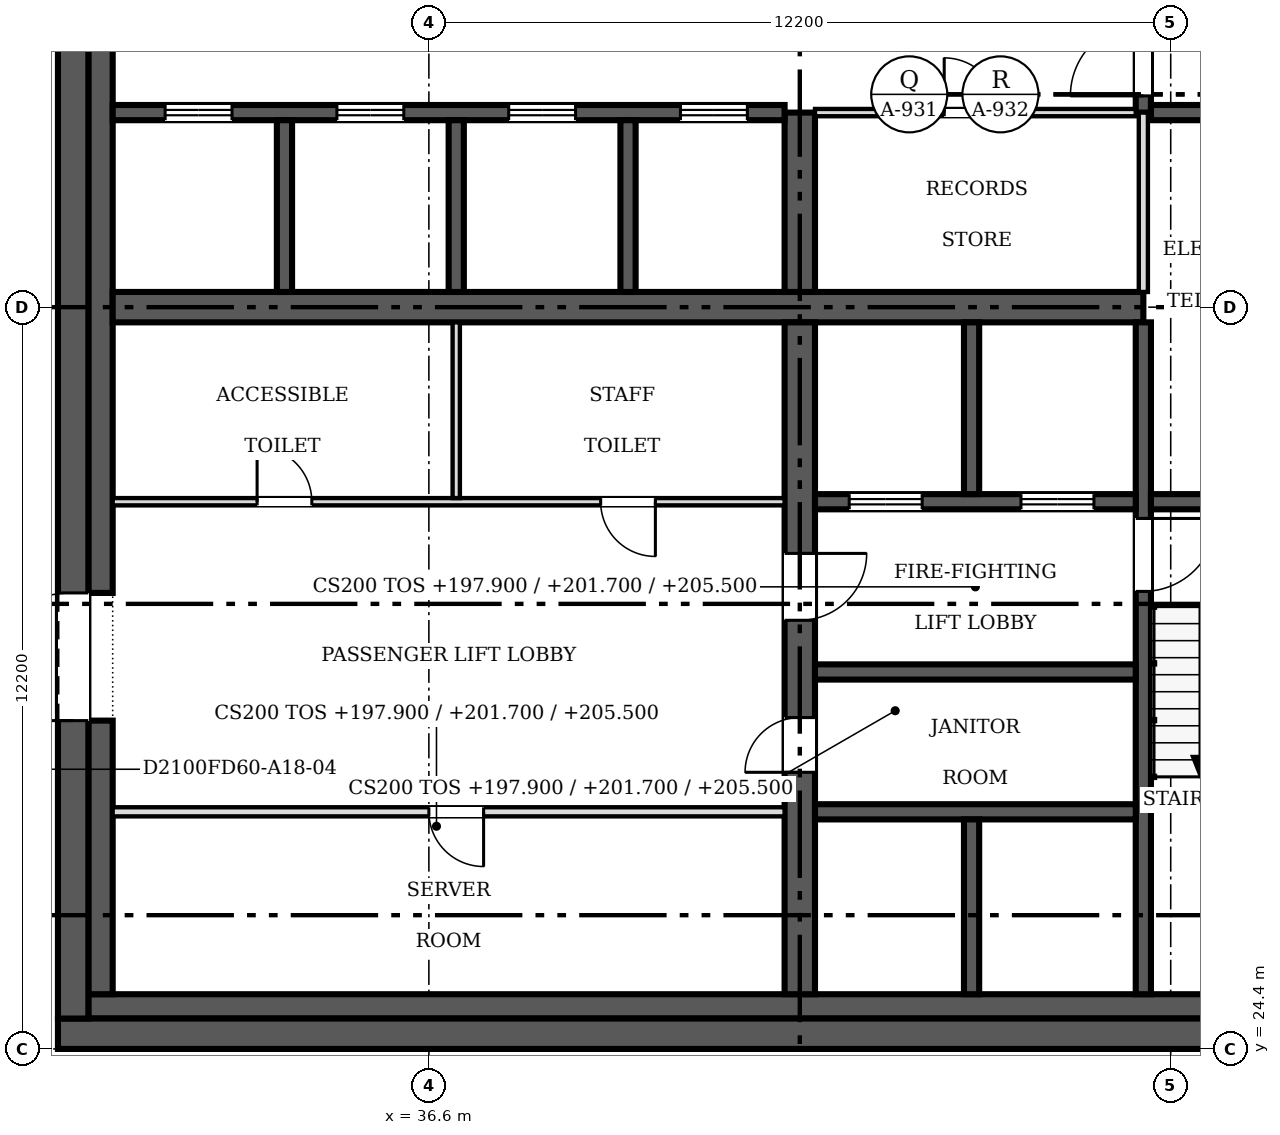
"""IFC4 building model, lengths in metres.
Left out: names, types, materials, properties, quantities, classifications, styles, units other than length and angle.
Written with IfcOpenShell. Run it as: python <this file> out.ifc"""

import sys

from ifc_helpers import new_model, si_unit, direction, frame, frame_2d, origin, place, context, subcontext, project, spatial, rectangle, extrude, source, transform, mapped, element, fill, save


model = new_model("IFC4")
c1 = context("Model", 3, precision=1e-05, world=origin(), true_north=direction((0.0, 1.0)))
c2 = subcontext(c1, "Body", "Model", "MODEL_VIEW")
j1 = project(units=[si_unit("LENGTHUNIT", "METRE"), si_unit("PLANEANGLEUNIT", "RADIAN")], contexts=[c1])
p1 = place(None, origin())
s1 = spatial("IfcSite", under=j1, at=p1, CompositionType="ELEMENT")
p2 = place(p1, origin())
s2 = spatial("IfcBuilding", under=s1, at=p2, CompositionType="ELEMENT")
p3 = place(p2, frame((0.0, 0.0, 197.9)))
s3 = spatial("IfcBuildingStorey", under=s2, at=p3, CompositionType="ELEMENT", Elevation=197.9)
p4 = place(p3, frame((54.9, 24.65, 0.0), z_axis=(0.0, 0.0, 1.0), x_axis=(-1.0, 0.0, 0.0)))
e1 = element("IfcWall", 1, at=p4, inside=s3, PredefinedType="SHEAR", context=c2, shape_type="SweptSolid", body=[
    extrude(rectangle(XDim=24.4, YDim=0.5, at=frame_2d((12.2, 0.0))), origin(), (0.0, 0.0, 1.0), 3.8),
])
m1 = source(origin(), c2, "Body", "SweptSolid", [
    extrude(rectangle(XDim=1.2, YDim=2.1, at=frame_2d((0.6, 1.05))), frame((0.0, 0.26, 0.0), z_axis=(0.0, -1.0, 0.0), x_axis=(1.0, 0.0, 0.0)), (0.0, 0.0, 1.0), 0.52),
])
p5 = place(p4, frame((1.5, 0.0, 0.0)))
e2 = element("IfcOpeningElement", 2, at=p5, cuts=e1, PredefinedType="OPENING", context=c2, shape_type="MappedRepresentation", body=[
    mapped(m1, transform((0.0, 0.0, 0.0), scale=1.0)),
])
p6 = place(p3, frame((30.75, 24.9, 0.0), z_axis=(0.0, 0.0, 1.0), x_axis=(0.0, 1.0, 0.0)))
e3 = element("IfcWall", 3, at=p6, inside=s3, PredefinedType="SHEAR", context=c2, shape_type="SweptSolid", body=[
    extrude(rectangle(XDim=23.4, YDim=0.5, at=frame_2d((11.7, 0.0))), origin(), (0.0, 0.0, 1.0), 3.8),
])
m2 = source(origin(), c2, "Body", "SweptSolid", [
    extrude(rectangle(XDim=2.1, YDim=2.4, at=frame_2d((1.05, 1.2))), frame((0.0, 0.26, 0.0), z_axis=(0.0, -1.0, 0.0), x_axis=(1.0, 0.0, 0.0)), (0.0, 0.0, 1.0), 0.52),
])
p7 = place(p6, frame((4.9, 0.0, 0.0)))
e4 = element("IfcOpeningElement", 4, at=p7, cuts=e3, PredefinedType="OPENING", context=c2, shape_type="MappedRepresentation", body=[
    mapped(m2, transform((0.0, 0.0, 0.0), scale=1.0)),
])
p8 = place(p6, frame((16.4, 0.0, 0.0)))
e5 = element("IfcOpeningElement", 5, at=p8, cuts=e3, PredefinedType="OPENING", context=c2, shape_type="MappedRepresentation", body=[
    mapped(m2, transform((0.0, 0.0, 0.0), scale=1.0)),
])
p9 = place(p3, frame((31.0, 25.1, 0.0), z_axis=(0.0, 0.0, 1.0), x_axis=(1.0, 0.0, 0.0)))
e6 = element("IfcWall", 6, at=p9, inside=s3, PredefinedType="SOLIDWALL", context=c2, shape_type="SweptSolid", body=[
    extrude(rectangle(XDim=21.2, YDim=0.4, at=frame_2d((10.6, 0.0))), origin(), (0.0, 0.0, 1.0), 3.8),
])
p10 = place(p3, frame((31.2, 25.3, 0.0), z_axis=(0.0, 0.0, 1.0), x_axis=(0.0, 1.0, 0.0)))
e7 = element("IfcWall", 7, at=p10, inside=s3, PredefinedType="SOLIDWALL", context=c2, shape_type="SweptSolid", body=[
    extrude(rectangle(XDim=4.5, YDim=0.4, at=frame_2d((2.25, 0.0))), origin(), (0.0, 0.0, 1.0), 3.8),
])
p11 = place(p3, frame((31.2, 31.9, 0.0), z_axis=(0.0, 0.0, 1.0), x_axis=(0.0, 1.0, 0.0)))
e8 = element("IfcWall", 8, at=p11, inside=s3, PredefinedType="SOLIDWALL", context=c2, shape_type="SweptSolid", body=[
    extrude(rectangle(XDim=9.4, YDim=0.4, at=frame_2d((4.7, 0.0))), origin(), (0.0, 0.0, 1.0), 3.8),
])
p12 = place(p3, frame((31.4, 36.6, 0.0), z_axis=(0.0, 0.0, 1.0), x_axis=(1.0, 0.0, 0.0)))
e9 = element("IfcWall", 9, at=p12, inside=s3, PredefinedType="SHEAR", context=c2, shape_type="SweptSolid", body=[
    extrude(rectangle(XDim=16.95, YDim=0.5, at=frame_2d((8.475, 0.0))), origin(), (0.0, 0.0, 1.0), 3.8),
])
p13 = place(p3, frame((42.7, 36.35, 0.0), z_axis=(0.0, 0.0, 1.0), x_axis=(0.0, -1.0, 0.0)))
e10 = element("IfcWall", 10, at=p13, inside=s3, PredefinedType="SHEAR", context=c2, shape_type="SweptSolid", body=[
    extrude(rectangle(XDim=11.05, YDim=0.5, at=frame_2d((5.525, 0.0))), origin(), (0.0, 0.0, 1.0), 3.8),
])
m3 = source(origin(), c2, "Body", "SweptSolid", [
    extrude(rectangle(XDim=0.9, YDim=2.1, at=frame_2d((0.45, 1.05))), frame((0.0, 0.26, 0.0), z_axis=(0.0, -1.0, 0.0), x_axis=(1.0, 0.0, 0.0)), (0.0, 0.0, 1.0), 0.52),
])
p14 = place(p13, frame((6.5, 0.0, 0.0)))
e11 = element("IfcOpeningElement", 11, at=p14, cuts=e10, PredefinedType="OPENING", context=c2, shape_type="MappedRepresentation", body=[
    mapped(m3, transform((0.0, 0.0, 0.0), scale=1.0)),
])
m4 = source(origin(), c2, "Body", "SweptSolid", [
    extrude(rectangle(XDim=1.1, YDim=2.1, at=frame_2d((0.55, 1.05))), frame((0.0, 0.26, 0.0), z_axis=(0.0, -1.0, 0.0), x_axis=(1.0, 0.0, 0.0)), (0.0, 0.0, 1.0), 0.52),
])
p15 = place(p13, frame((3.8, 0.0, 0.0)))
e12 = element("IfcOpeningElement", 12, at=p15, cuts=e10, PredefinedType="OPENING", context=c2, shape_type="MappedRepresentation", body=[
    mapped(m4, transform((0.0, 0.0, 0.0), scale=1.0)),
])
p16 = place(p3, frame((42.7, 36.85, 0.0), z_axis=(0.0, 0.0, 1.0), x_axis=(0.0, 1.0, 0.0)))
e13 = element("IfcWall", 13, at=p16, inside=s3, PredefinedType="SHEAR", context=c2, shape_type="SweptSolid", body=[
    extrude(rectangle(XDim=2.95, YDim=0.5, at=frame_2d((1.475, 0.0))), origin(), (0.0, 0.0, 1.0), 3.8),
])
p17 = place(p3, frame((31.4, 39.8, 0.0), z_axis=(0.0, 0.0, 1.0), x_axis=(1.0, 0.0, 0.0)))
e14 = element("IfcWall", 14, at=p17, inside=s3, PredefinedType="SOLIDWALL", context=c2, shape_type="SweptSolid", body=[
    extrude(rectangle(XDim=11.05, YDim=0.25, at=frame_2d((5.525, 0.0))), origin(), (0.0, 0.0, 1.0), 3.8),
])
m5 = source(origin(), c2, "Body", "SweptSolid", [
    extrude(rectangle(XDim=1.1, YDim=2.1, at=frame_2d((0.55, 1.05))), frame((0.0, 0.135, 0.0), z_axis=(0.0, -1.0, 0.0), x_axis=(1.0, 0.0, 0.0)), (0.0, 0.0, 1.0), 0.27),
])
p18 = place(p17, frame((0.863, 0.0, 0.0)))
e15 = element("IfcOpeningElement", 15, at=p18, cuts=e14, PredefinedType="OPENING", context=c2, shape_type="MappedRepresentation", body=[
    mapped(m5, transform((0.0, 0.0, 0.0), scale=1.0)),
])
p19 = place(p17, frame((3.688, 0.0, 0.0)))
e16 = element("IfcOpeningElement", 16, at=p19, cuts=e14, PredefinedType="OPENING", context=c2, shape_type="MappedRepresentation", body=[
    mapped(m5, transform((0.0, 0.0, 0.0), scale=1.0)),
])
p20 = place(p17, frame((6.512, 0.0, 0.0)))
e17 = element("IfcOpeningElement", 17, at=p20, cuts=e14, PredefinedType="OPENING", context=c2, shape_type="MappedRepresentation", body=[
    mapped(m5, transform((0.0, 0.0, 0.0), scale=1.0)),
])
p21 = place(p17, frame((9.337, 0.0, 0.0)))
e18 = element("IfcOpeningElement", 18, at=p21, cuts=e14, PredefinedType="OPENING", context=c2, shape_type="MappedRepresentation", body=[
    mapped(m5, transform((0.0, 0.0, 0.0), scale=1.0)),
])
p22 = place(p3, frame((48.35, 36.35, 0.0), z_axis=(0.0, 0.0, 1.0), x_axis=(0.0, -1.0, 0.0)))
e19 = element("IfcWall", 19, at=p22, inside=s3, PredefinedType="SOLIDWALL", context=c2, shape_type="SweptSolid", body=[
    extrude(rectangle(XDim=11.05, YDim=0.25, at=frame_2d((5.525, 0.0))), origin(), (0.0, 0.0, 1.0), 3.8),
])
m6 = source(origin(), c2, "Body", "SweptSolid", [
    extrude(rectangle(XDim=1.2, YDim=2.1, at=frame_2d((0.6, 1.05))), frame((0.0, 0.135, 0.0), z_axis=(0.0, -1.0, 0.0), x_axis=(1.0, 0.0, 0.0)), (0.0, 0.0, 1.0), 0.27),
])
p23 = place(p22, frame((3.225, 0.0, 0.0)))
e20 = element("IfcOpeningElement", 20, at=p23, cuts=e19, PredefinedType="OPENING", context=c2, shape_type="MappedRepresentation", body=[
    mapped(m6, transform((0.0, 0.0, 0.0), scale=1.0)),
])
p24 = place(p3, frame((48.225, 33.4, 0.0), z_axis=(0.0, 0.0, 1.0), x_axis=(-1.0, 0.0, 0.0)))
e21 = element("IfcWall", 21, at=p24, inside=s3, PredefinedType="SOLIDWALL", context=c2, shape_type="SweptSolid", body=[
    extrude(rectangle(XDim=5.275, YDim=0.25, at=frame_2d((2.638, 0.0))), origin(), (0.0, 0.0, 1.0), 3.8),
])
p25 = place(p24, frame((3.512, 0.0, 0.0)))
e22 = element("IfcOpeningElement", 22, at=p25, cuts=e21, PredefinedType="OPENING", context=c2, shape_type="MappedRepresentation", body=[
    mapped(m6, transform((0.0, 0.0, 0.0), scale=1.0)),
])
p26 = place(p24, frame((0.688, 0.0, 0.0)))
e23 = element("IfcOpeningElement", 23, at=p26, cuts=e21, PredefinedType="OPENING", context=c2, shape_type="MappedRepresentation", body=[
    mapped(m6, transform((0.0, 0.0, 0.0), scale=1.0)),
])
p27 = place(p3, frame((48.475, 33.4, 0.0), z_axis=(0.0, 0.0, 1.0), x_axis=(1.0, 0.0, 0.0)))
e24 = element("IfcWall", 24, at=p27, inside=s3, PredefinedType="SOLIDWALL", context=c2, shape_type="SweptSolid", body=[
    extrude(rectangle(XDim=3.525, YDim=0.25, at=frame_2d((1.762, 0.0))), origin(), (0.0, 0.0, 1.0), 3.8),
])
p28 = place(p3, frame((48.35, 47.9, 0.0), z_axis=(0.0, 0.0, 1.0), x_axis=(0.0, -1.0, 0.0)))
e25 = element("IfcWall", 25, at=p28, inside=s3, PredefinedType="SOLIDWALL", context=c2, shape_type="SweptSolid", body=[
    extrude(rectangle(XDim=8.1, YDim=0.25, at=frame_2d((4.05, 0.0))), origin(), (0.0, 0.0, 1.0), 3.8),
])
p29 = place(p28, frame((6.625, 0.0, 0.0)))
e26 = element("IfcOpeningElement", 26, at=p29, cuts=e25, PredefinedType="OPENING", context=c2, shape_type="MappedRepresentation", body=[
    mapped(m6, transform((0.0, 0.0, 0.0), scale=1.0)),
])
for number, where, z_axis, x_axis in (
    (27, (42.95, 28.3, 0.0), (0.0, 0.0, 1.0), (1.0, 0.0, 0.0)),
    (28, (42.95, 30.6, 0.0), (0.0, 0.0, 1.0), (1.0, 0.0, 0.0)),
):
    element("IfcWall", number, at=place(p3, frame(where, z_axis=z_axis, x_axis=x_axis)), inside=s3, PredefinedType="SOLIDWALL", context=c2, shape_type="SweptSolid", body=[
        extrude(rectangle(XDim=5.275, YDim=0.25, at=frame_2d((2.638, 0.0))), origin(), (0.0, 0.0, 1.0), 3.8),
    ])
p30 = place(p3, frame((48.475, 39.8, 0.0), z_axis=(0.0, 0.0, 1.0), x_axis=(1.0, 0.0, 0.0)))
e29 = element("IfcWall", 29, at=p30, inside=s3, PredefinedType="SOLIDWALL", context=c2, shape_type="SweptSolid", body=[
    extrude(rectangle(XDim=3.4, YDim=0.25, at=frame_2d((1.7, 0.0))), origin(), (0.0, 0.0, 1.0), 3.8),
])
for number, where, z_axis, x_axis in (
    (30, (34.225, 36.85, 0.0), (0.0, 0.0, 1.0), (0.0, 1.0, 0.0)),
    (31, (37.05, 36.85, 0.0), (0.0, 0.0, 1.0), (0.0, 1.0, 0.0)),
    (32, (39.875, 36.85, 0.0), (0.0, 0.0, 1.0), (0.0, 1.0, 0.0)),
):
    element("IfcWall", number, at=place(p3, frame(where, z_axis=z_axis, x_axis=x_axis)), inside=s3, PredefinedType="SOLIDWALL", context=c2, shape_type="SweptSolid", body=[
        extrude(rectangle(XDim=2.825, YDim=0.25, at=frame_2d((1.413, 0.0))), origin(), (0.0, 0.0, 1.0), 3.8),
    ])
p31 = place(p3, frame((45.525, 33.525, 0.0), z_axis=(0.0, 0.0, 1.0), x_axis=(0.0, 1.0, 0.0)))
e33 = element("IfcWall", 33, at=p31, inside=s3, PredefinedType="SOLIDWALL", context=c2, shape_type="SweptSolid", body=[
    extrude(rectangle(XDim=2.825, YDim=0.25, at=frame_2d((1.413, 0.0))), origin(), (0.0, 0.0, 1.0), 3.8),
])
p32 = place(p3, frame((45.525, 25.3, 0.0), z_axis=(0.0, 0.0, 1.0), x_axis=(0.0, 1.0, 0.0)))
e34 = element("IfcWall", 34, at=p32, inside=s3, PredefinedType="SOLIDWALL", context=c2, shape_type="SweptSolid", body=[
    extrude(rectangle(XDim=2.875, YDim=0.25, at=frame_2d((1.438, 0.0))), origin(), (0.0, 0.0, 1.0), 3.8),
])
p33 = place(p3, frame((42.45, 28.3, 0.0), z_axis=(0.0, 0.0, 1.0), x_axis=(-1.0, 0.0, 0.0)))
e35 = element("IfcWall", 35, at=p33, inside=s3, PredefinedType="PARTITIONING", context=c2, shape_type="SweptSolid", body=[
    extrude(rectangle(XDim=11.05, YDim=0.15, at=frame_2d((5.525, 0.0))), origin(), (0.0, 0.0, 1.0), 3.6),
])
m7 = source(origin(), c2, "Body", "SweptSolid", [
    extrude(rectangle(XDim=0.9, YDim=2.1, at=frame_2d((0.45, 1.05))), frame((0.0, 0.085, 0.0), z_axis=(0.0, -1.0, 0.0), x_axis=(1.0, 0.0, 0.0)), (0.0, 0.0, 1.0), 0.17),
])
p34 = place(p33, frame((4.95, 0.0, 0.0)))
e36 = element("IfcOpeningElement", 36, at=p34, cuts=e35, PredefinedType="OPENING", context=c2, shape_type="MappedRepresentation", body=[
    mapped(m7, transform((0.0, 0.0, 0.0), scale=1.0)),
])
p35 = place(p3, frame((31.4, 33.4, 0.0), z_axis=(0.0, 0.0, 1.0), x_axis=(1.0, 0.0, 0.0)))
e37 = element("IfcWall", 37, at=p35, inside=s3, PredefinedType="PARTITIONING", context=c2, shape_type="SweptSolid", body=[
    extrude(rectangle(XDim=11.05, YDim=0.12, at=frame_2d((5.525, 0.0))), origin(), (0.0, 0.0, 1.0), 3.6),
])
m8 = source(origin(), c2, "Body", "SweptSolid", [
    extrude(rectangle(XDim=0.9, YDim=2.1, at=frame_2d((0.45, 1.05))), frame((0.0, 0.07, 0.0), z_axis=(0.0, -1.0, 0.0), x_axis=(1.0, 0.0, 0.0)), (0.0, 0.0, 1.0), 0.14),
])
p36 = place(p35, frame((2.375, 0.0, 0.0)))
e38 = element("IfcOpeningElement", 38, at=p36, cuts=e37, PredefinedType="OPENING", context=c2, shape_type="MappedRepresentation", body=[
    mapped(m8, transform((0.0, 0.0, 0.0), scale=1.0)),
])
p37 = place(p35, frame((8.025, 0.0, 0.0)))
e39 = element("IfcOpeningElement", 39, at=p37, cuts=e37, PredefinedType="OPENING", context=c2, shape_type="MappedRepresentation", body=[
    mapped(m8, transform((0.0, 0.0, 0.0), scale=1.0)),
])
p38 = place(p3, frame((48.225, 39.8, 0.0), z_axis=(0.0, 0.0, 1.0), x_axis=(-1.0, 0.0, 0.0)))
e40 = element("IfcWall", 40, at=p38, inside=s3, PredefinedType="PARTITIONING", context=c2, shape_type="SweptSolid", body=[
    extrude(rectangle(XDim=5.275, YDim=0.12, at=frame_2d((2.638, 0.0))), origin(), (0.0, 0.0, 1.0), 3.6),
])
p39 = place(p38, frame((2.25, 0.0, 0.0)))
e41 = element("IfcOpeningElement", 41, at=p39, cuts=e40, PredefinedType="OPENING", context=c2, shape_type="MappedRepresentation", body=[
    mapped(m8, transform((0.0, 0.0, 0.0), scale=1.0)),
])
p40 = place(p3, frame((48.35, 36.85, 0.0), z_axis=(0.0, 0.0, 1.0), x_axis=(0.0, 1.0, 0.0)))
e42 = element("IfcWall", 42, at=p40, inside=s3, PredefinedType="PARTITIONING", context=c2, shape_type="SweptSolid", body=[
    extrude(rectangle(XDim=2.95, YDim=0.15, at=frame_2d((1.475, 0.0))), origin(), (0.0, 0.0, 1.0), 3.6),
])
p41 = place(p3, frame((37.05, 33.46, 0.0), z_axis=(0.0, 0.0, 1.0), x_axis=(0.0, 1.0, 0.0)))
e43 = element("IfcWall", 43, at=p41, inside=s3, PredefinedType="PARTITIONING", context=c2, shape_type="SweptSolid", body=[
    extrude(rectangle(XDim=2.89, YDim=0.12, at=frame_2d((1.445, 0.0))), origin(), (0.0, 0.0, 1.0), 3.6),
])
m9 = source(origin(), c2, "Body", "SweptSolid", [
    extrude(rectangle(XDim=2.1, YDim=2.4, at=frame_2d((1.05, 1.2))), frame((0.0, 0.025, 0.0), z_axis=(0.0, -1.0, 0.0), x_axis=(1.0, 0.0, 0.0)), (0.0, 0.0, 1.0), 0.05),
])
p42 = place(p7, origin())
e44 = element("IfcDoor", 44, at=p42, inside=s3, OperationType="DOUBLE_DOOR_SINGLE_SWING", PredefinedType="DOOR", context=c2, shape_type="MappedRepresentation", body=[
    mapped(m9, transform((0.0, 0.0, 0.0), scale=1.0)),
])
fill(e4, e44)
m10 = source(origin(), c2, "Body", "SweptSolid", [
    extrude(rectangle(XDim=0.9, YDim=2.1, at=frame_2d((0.45, 1.05))), frame((0.0, 0.025, 0.0), z_axis=(0.0, -1.0, 0.0), x_axis=(1.0, 0.0, 0.0)), (0.0, 0.0, 1.0), 0.05),
])
p43 = place(p14, origin())
e45 = element("IfcDoor", 45, at=p43, inside=s3, OperationType="SINGLE_SWING_RIGHT", PredefinedType="DOOR", context=c2, shape_type="MappedRepresentation", body=[
    mapped(m10, transform((0.0, 0.0, 0.0), scale=1.0)),
])
fill(e11, e45)
m11 = source(origin(), c2, "Body", "SweptSolid", [
    extrude(rectangle(XDim=1.1, YDim=2.1, at=frame_2d((0.55, 1.05))), frame((0.0, 0.025, 0.0), z_axis=(0.0, -1.0, 0.0), x_axis=(1.0, 0.0, 0.0)), (0.0, 0.0, 1.0), 0.05),
])
p44 = place(p15, origin())
e46 = element("IfcDoor", 46, at=p44, inside=s3, OperationType="SINGLE_SWING_LEFT", PredefinedType="DOOR", context=c2, shape_type="MappedRepresentation", body=[
    mapped(m11, transform((0.0, 0.0, 0.0), scale=1.0)),
])
fill(e12, e46)
p45 = place(p18, origin())
e47 = element("IfcDoor", 47, at=p45, inside=s3, OperationType="DOUBLE_DOOR_SLIDING", PredefinedType="DOOR", context=c2, shape_type="MappedRepresentation", body=[
    mapped(m11, transform((0.0, 0.0, 0.0), scale=1.0)),
])
fill(e15, e47)
p46 = place(p19, origin())
e48 = element("IfcDoor", 48, at=p46, inside=s3, OperationType="DOUBLE_DOOR_SLIDING", PredefinedType="DOOR", context=c2, shape_type="MappedRepresentation", body=[
    mapped(m11, transform((0.0, 0.0, 0.0), scale=1.0)),
])
fill(e16, e48)
p47 = place(p20, origin())
e49 = element("IfcDoor", 49, at=p47, inside=s3, OperationType="DOUBLE_DOOR_SLIDING", PredefinedType="DOOR", context=c2, shape_type="MappedRepresentation", body=[
    mapped(m11, transform((0.0, 0.0, 0.0), scale=1.0)),
])
fill(e17, e49)
p48 = place(p21, origin())
e50 = element("IfcDoor", 50, at=p48, inside=s3, OperationType="DOUBLE_DOOR_SLIDING", PredefinedType="DOOR", context=c2, shape_type="MappedRepresentation", body=[
    mapped(m11, transform((0.0, 0.0, 0.0), scale=1.0)),
])
fill(e18, e50)
m12 = source(origin(), c2, "Body", "SweptSolid", [
    extrude(rectangle(XDim=1.2, YDim=2.1, at=frame_2d((0.6, 1.05))), frame((0.0, 0.025, 0.0), z_axis=(0.0, -1.0, 0.0), x_axis=(1.0, 0.0, 0.0)), (0.0, 0.0, 1.0), 0.05),
])
p49 = place(p23, origin())
e51 = element("IfcDoor", 51, at=p49, inside=s3, OperationType="SINGLE_SWING_LEFT", PredefinedType="DOOR", context=c2, shape_type="MappedRepresentation", body=[
    mapped(m12, transform((0.0, 0.0, 0.0), scale=1.0)),
])
fill(e20, e51)
p50 = place(p25, origin())
e52 = element("IfcDoor", 52, at=p50, inside=s3, OperationType="DOUBLE_DOOR_SLIDING", PredefinedType="DOOR", context=c2, shape_type="MappedRepresentation", body=[
    mapped(m12, transform((0.0, 0.0, 0.0), scale=1.0)),
])
fill(e22, e52)
p51 = place(p26, origin())
e53 = element("IfcDoor", 53, at=p51, inside=s3, OperationType="DOUBLE_DOOR_SLIDING", PredefinedType="DOOR", context=c2, shape_type="MappedRepresentation", body=[
    mapped(m12, transform((0.0, 0.0, 0.0), scale=1.0)),
])
fill(e23, e53)
p52 = place(p29, origin())
e54 = element("IfcDoor", 54, at=p52, inside=s3, OperationType="SINGLE_SWING_RIGHT", PredefinedType="DOOR", context=c2, shape_type="MappedRepresentation", body=[
    mapped(m12, transform((0.0, 0.0, 0.0), scale=1.0)),
])
fill(e26, e54)
p53 = place(p34, origin())
e55 = element("IfcDoor", 55, at=p53, inside=s3, OperationType="SINGLE_SWING_LEFT", PredefinedType="DOOR", context=c2, shape_type="MappedRepresentation", body=[
    mapped(m10, transform((0.0, 0.0, 0.0), scale=1.0)),
])
fill(e36, e55)
p54 = place(p36, origin())
e56 = element("IfcDoor", 56, at=p54, inside=s3, OperationType="SINGLE_SWING_LEFT", PredefinedType="DOOR", context=c2, shape_type="MappedRepresentation", body=[
    mapped(m10, transform((0.0, 0.0, 0.0), scale=1.0)),
])
fill(e38, e56)
p55 = place(p37, origin())
e57 = element("IfcDoor", 57, at=p55, inside=s3, OperationType="SINGLE_SWING_RIGHT", PredefinedType="DOOR", context=c2, shape_type="MappedRepresentation", body=[
    mapped(m10, transform((0.0, 0.0, 0.0), scale=1.0)),
])
fill(e39, e57)
p56 = place(p39, origin())
e58 = element("IfcDoor", 58, at=p56, inside=s3, OperationType="SINGLE_SWING_RIGHT", PredefinedType="DOOR", context=c2, shape_type="MappedRepresentation", body=[
    mapped(m10, transform((0.0, 0.0, 0.0), scale=1.0)),
])
fill(e41, e58)
save(model, sys.argv[1])
